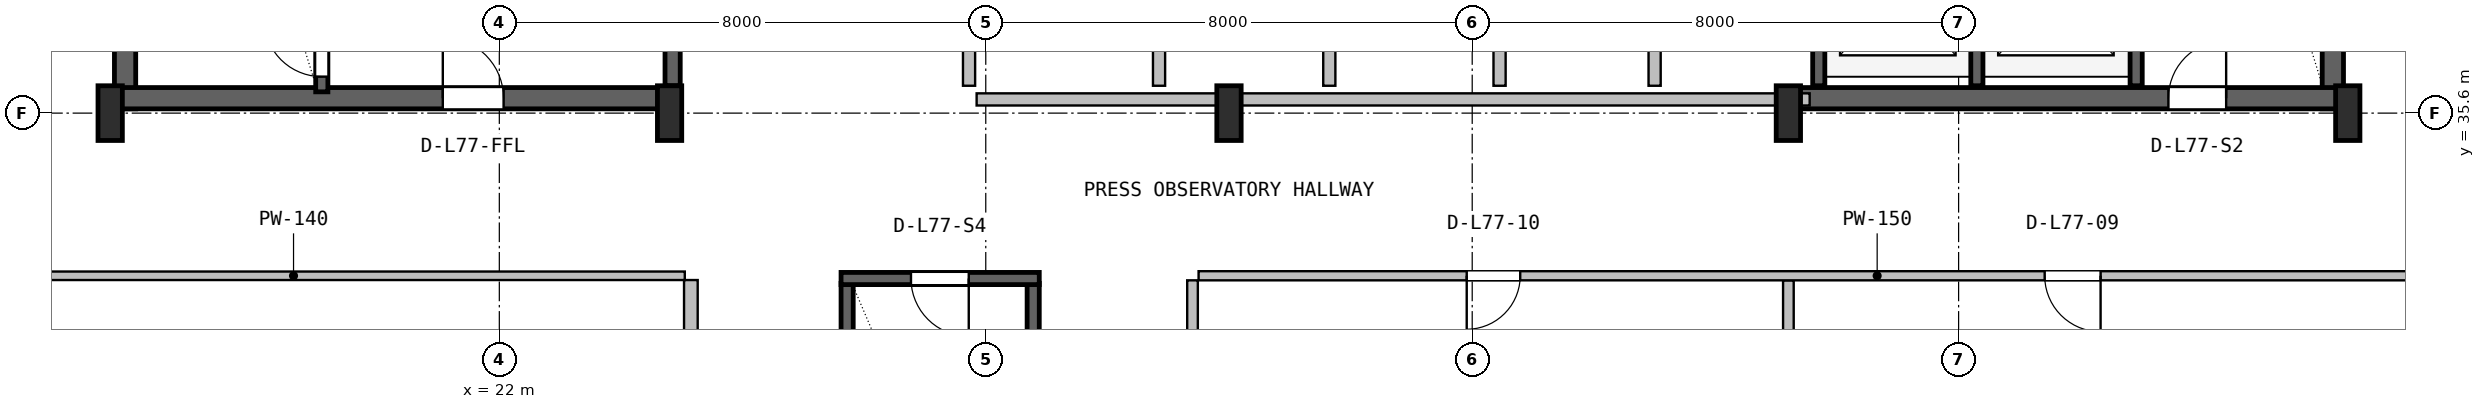
"""IFC4 building model, lengths in metres.
Left out: names, types, materials, properties, quantities, classifications, styles, units other than length and angle.
Written with IfcOpenShell. Run it as: python <this file> out.ifc"""

import sys

from ifc_helpers import new_model, si_unit, direction, frame, frame_2d, origin, origin_2d, place, context, subcontext, project, spatial, rectangle, i_section, extrude, source, transform, mapped, element, fill, save


model = new_model("IFC4")
c1 = context("Model", 3, precision=1e-05, world=origin(), true_north=direction((0.0, 1.0)))
c2 = subcontext(c1, "Body", "Model", "MODEL_VIEW")
j1 = project(units=[si_unit("LENGTHUNIT", "METRE"), si_unit("PLANEANGLEUNIT", "RADIAN")], contexts=[c1])
p1 = place(None, origin())
s1 = spatial("IfcSite", under=j1, at=p1, CompositionType="ELEMENT")
p2 = place(p1, origin())
s2 = spatial("IfcBuilding", under=s1, at=p2, CompositionType="ELEMENT")
p3 = place(p2, frame((0.0, 0.0, 309.8)))
s3 = spatial("IfcBuildingStorey", under=s2, at=p3, CompositionType="ELEMENT", Elevation=309.8)
for number, where, z_axis, x_axis in (
    (1, (15.845, 35.67, 0.0), (0.0, 0.0, 1.0), (0.0, 1.0, 0.0)),
    (2, (52.155, 35.67, 0.0), (0.0, 0.0, 1.0), (0.0, 1.0, 0.0)),
):
    element("IfcWall", number, at=place(p3, frame(where, z_axis=z_axis, x_axis=x_axis)), inside=s3, PredefinedType="SHEAR", context=c2, shape_type="SweptSolid", body=[
        extrude(rectangle(XDim=11.13, YDim=0.35, at=frame_2d((5.565, 0.0))), origin(), (0.0, 0.0, 1.0), 4.48),
    ])
p4 = place(p3, frame((15.67, 35.845, 0.0), z_axis=(0.0, 0.0, 1.0), x_axis=(1.0, 0.0, 0.0)))
e3 = element("IfcWall", 3, at=p4, inside=s3, PredefinedType="SHEAR", context=c2, shape_type="SweptSolid", body=[
    extrude(rectangle(XDim=9.13, YDim=0.35, at=frame_2d((4.565, 0.0))), origin(), (0.0, 0.0, 1.0), 4.48),
])
p5 = place(p4, frame((5.4, 0.0, 0.0)))
e4 = element("IfcOpeningElement", 4, at=p5, cuts=e3, PredefinedType="OPENING", context=c2, shape_type="SweptSolid", body=[
    extrude(rectangle(XDim=1.0, YDim=2.1, at=frame_2d((0.5, 1.05))), frame((0.0, 0.185, 0.0), z_axis=(0.0, -1.0, 0.0), x_axis=(1.0, 0.0, 0.0)), (0.0, 0.0, 1.0), 0.37),
])
p6 = place(p3, frame((43.2, 35.845, 0.0), z_axis=(0.0, 0.0, 1.0), x_axis=(1.0, 0.0, 0.0)))
e5 = element("IfcWall", 5, at=p6, inside=s3, PredefinedType="SHEAR", context=c2, shape_type="SweptSolid", body=[
    extrude(rectangle(XDim=9.13, YDim=0.35, at=frame_2d((4.565, 0.0))), origin(), (0.0, 0.0, 1.0), 4.48),
])
p7 = place(p6, frame((6.25, 0.0, 0.0)))
e6 = element("IfcOpeningElement", 6, at=p7, cuts=e5, PredefinedType="OPENING", context=c2, shape_type="SweptSolid", body=[
    extrude(rectangle(XDim=0.95, YDim=2.1, at=frame_2d((0.475, 1.05))), frame((0.0, 0.185, 0.0), z_axis=(0.0, -1.0, 0.0), x_axis=(1.0, 0.0, 0.0)), (0.0, 0.0, 1.0), 0.37),
])
m1 = source(origin(), c2, "Body", "SweptSolid", [
    extrude(i_section(OverallWidth=0.4, OverallDepth=0.9, WebThickness=0.016, FlangeThickness=0.028, FilletRadius=0.016, at=origin_2d()), origin(), (0.0, 0.0, 1.0), 4.8),
])
for number, where, z_axis, x_axis in (
    (7, (15.6, 35.6, 0.0), (0.0, 0.0, 1.0), (1.0, 0.0, 0.0)),
    (8, (24.8, 35.6, 0.0), (0.0, 0.0, 1.0), (1.0, 0.0, 0.0)),
    (9, (34.0, 35.6, 0.0), (0.0, 0.0, 1.0), (1.0, 0.0, 0.0)),
    (10, (43.2, 35.6, 0.0), (0.0, 0.0, 1.0), (1.0, 0.0, 0.0)),
    (11, (52.4, 35.6, 0.0), (0.0, 0.0, 1.0), (1.0, 0.0, 0.0)),
):
    element("IfcColumn", number, at=place(p3, frame(where, z_axis=z_axis, x_axis=x_axis)), inside=s3, PredefinedType="COLUMN", context=c2, shape_type="MappedRepresentation", body=[
        mapped(m1, transform((0.0, 0.0, 0.0), x_axis=(1.0, 0.0, 0.0), y_axis=(0.0, 1.0, 0.0), z_axis=(0.0, 0.0, 1.0), scale=1.0)),
    ])
p8 = place(p3, frame((19.08, 35.95, 0.0), z_axis=(0.0, 0.0, 1.0), x_axis=(0.0, 1.0, 0.0)))
e12 = element("IfcWall", 12, at=p8, inside=s3, PredefinedType="SHEAR", context=c2, shape_type="SweptSolid", body=[
    extrude(rectangle(XDim=9.65, YDim=0.2, at=frame_2d((4.825, 0.0))), origin(), (0.0, 0.0, 1.0), 4.48),
])
p9 = place(p8, frame((0.25, 0.0, 0.0)))
e13 = element("IfcOpeningElement", 13, at=p9, cuts=e12, PredefinedType="OPENING", context=c2, shape_type="SweptSolid", body=[
    extrude(rectangle(XDim=0.95, YDim=2.1, at=frame_2d((0.475, 1.05))), frame((0.0, 0.11, 0.0), z_axis=(0.0, -1.0, 0.0), x_axis=(1.0, 0.0, 0.0)), (0.0, 0.0, 1.0), 0.22),
])
p10 = place(p3, frame((24.85, 36.05, 0.0), z_axis=(0.0, 0.0, 1.0), x_axis=(0.0, 1.0, 0.0)))
e14 = element("IfcWall", 14, at=p10, inside=s3, PredefinedType="SHEAR", context=c2, shape_type="SweptSolid", body=[
    extrude(rectangle(XDim=10.45, YDim=0.25, at=frame_2d((5.225, 0.0))), origin(), (0.0, 0.0, 1.0), 4.48),
])
p11 = place(p3, frame((48.92, 36.05, 0.0), z_axis=(0.0, 0.0, 1.0), x_axis=(0.0, 1.0, 0.0)))
e15 = element("IfcWall", 15, at=p11, inside=s3, PredefinedType="SHEAR", context=c2, shape_type="SweptSolid", body=[
    extrude(rectangle(XDim=10.5, YDim=0.2, at=frame_2d((5.25, 0.0))), origin(), (0.0, 0.0, 1.0), 4.48),
])
for number, where, z_axis, x_axis in (
    (16, (43.7, 36.05, 0.0), (0.0, 0.0, 1.0), (0.0, 1.0, 0.0)),
    (17, (46.3, 36.05, 0.0), (0.0, 0.0, 1.0), (0.0, 1.0, 0.0)),
):
    element("IfcWall", number, at=place(p3, frame(where, z_axis=z_axis, x_axis=x_axis)), inside=s3, PredefinedType="SHEAR", context=c2, shape_type="SweptSolid", body=[
        extrude(rectangle(XDim=3.05, YDim=0.2, at=frame_2d((1.525, 0.0))), origin(), (0.0, 0.0, 1.0), 4.48),
    ])
for number, where, z_axis, x_axis in (
    (18, (27.72, 26.0, 0.0), (0.0, 0.0, 1.0), (0.0, 1.0, 0.0)),
    (19, (30.78, 26.0, 0.0), (0.0, 0.0, 1.0), (0.0, 1.0, 0.0)),
):
    element("IfcWall", number, at=place(p3, frame(where, z_axis=z_axis, x_axis=x_axis)), inside=s3, PredefinedType="SHEAR", context=c2, shape_type="SweptSolid", body=[
        extrude(rectangle(XDim=6.8, YDim=0.2, at=frame_2d((3.4, 0.0))), origin(), (0.0, 0.0, 1.0), 4.48),
    ])
p12 = place(p3, frame((27.62, 32.88, 0.0), z_axis=(0.0, 0.0, 1.0), x_axis=(1.0, 0.0, 0.0)))
e20 = element("IfcWall", 20, at=p12, inside=s3, PredefinedType="SHEAR", context=c2, shape_type="SweptSolid", body=[
    extrude(rectangle(XDim=3.26, YDim=0.2, at=frame_2d((1.63, 0.0))), origin(), (0.0, 0.0, 1.0), 4.48),
])
p13 = place(p12, frame((1.15, 0.0, 0.0)))
e21 = element("IfcOpeningElement", 21, at=p13, cuts=e20, PredefinedType="OPENING", context=c2, shape_type="SweptSolid", body=[
    extrude(rectangle(XDim=0.95, YDim=2.1, at=frame_2d((0.475, 1.05))), frame((0.0, 0.11, 0.0), z_axis=(0.0, -1.0, 0.0), x_axis=(1.0, 0.0, 0.0)), (0.0, 0.0, 1.0), 0.22),
])
p14 = place(p3, frame((29.85, 35.825, 0.0), z_axis=(0.0, 0.0, 1.0), x_axis=(1.0, 0.0, 0.0)))
e22 = element("IfcWall", 22, at=p14, inside=s3, PredefinedType="SOLIDWALL", context=c2, shape_type="SweptSolid", body=[
    extrude(rectangle(XDim=13.7, YDim=0.2, at=frame_2d((6.85, 0.0))), origin(), (0.0, 0.0, 1.0), 3.505),
])
for number, where, z_axis, x_axis in (
    (23, (32.85, 36.05, 0.0), (0.0, 0.0, 1.0), (0.0, 1.0, 0.0)),
    (24, (29.725, 36.05, 0.0), (0.0, 0.0, 1.0), (0.0, 1.0, 0.0)),
    (25, (35.65, 36.05, 0.0), (0.0, 0.0, 1.0), (0.0, 1.0, 0.0)),
    (26, (38.45, 36.05, 0.0), (0.0, 0.0, 1.0), (0.0, 1.0, 0.0)),
):
    element("IfcWall", number, at=place(p3, frame(where, z_axis=z_axis, x_axis=x_axis)), inside=s3, PredefinedType="PLUMBINGWALL", context=c2, shape_type="SweptSolid", body=[
        extrude(rectangle(XDim=3.1, YDim=0.2, at=frame_2d((1.55, 0.0))), origin(), (0.0, 0.0, 1.0), 4.46),
    ])
p15 = place(p3, frame((41.0, 36.05, 0.0), z_axis=(0.0, 0.0, 1.0), x_axis=(0.0, 1.0, 0.0)))
e27 = element("IfcWall", 27, at=p15, inside=s3, PredefinedType="SOLIDWALL", context=c2, shape_type="SweptSolid", body=[
    extrude(rectangle(XDim=3.1, YDim=0.2, at=frame_2d((1.55, 0.0))), origin(), (0.0, 0.0, 1.0), 4.46),
])
p16 = place(p3, frame((25.15, 13.38, 0.0), z_axis=(0.0, 0.0, 1.0), x_axis=(0.0, 1.0, 0.0)))
e28 = element("IfcWall", 28, at=p16, inside=s3, PredefinedType="PARTITIONING", context=c2, shape_type="SweptSolid", body=[
    extrude(rectangle(XDim=19.475, YDim=0.225, at=frame_2d((9.738, 0.0))), origin(), (0.0, 0.0, 1.0), 3.911),
])
p17 = place(p16, frame((4.465, 0.0, 0.0)))
e29 = element("IfcOpeningElement", 29, at=p17, cuts=e28, PredefinedType="OPENING", context=c2, shape_type="SweptSolid", body=[
    extrude(rectangle(XDim=1.4, YDim=2.12, at=frame_2d((0.7, 1.06))), frame((0.0, 0.123, 0.0), z_axis=(0.0, -1.0, 0.0), x_axis=(1.0, 0.0, 0.0)), (0.0, 0.0, 1.0), 0.245),
])
p18 = place(p16, frame((14.02, 0.0, 0.0)))
e30 = element("IfcOpeningElement", 30, at=p18, cuts=e28, PredefinedType="OPENING", context=c2, shape_type="SweptSolid", body=[
    extrude(rectangle(XDim=1.0, YDim=2.1, at=frame_2d((0.5, 1.05))), frame((0.0, 0.123, 0.0), z_axis=(0.0, -1.0, 0.0), x_axis=(1.0, 0.0, 0.0)), (0.0, 0.0, 1.0), 0.245),
])
p19 = place(p3, frame((12.18, 32.925, 0.0), z_axis=(0.0, 0.0, 1.0), x_axis=(1.0, 0.0, 0.0)))
e31 = element("IfcWall", 31, at=p19, inside=s3, PredefinedType="PARTITIONING", context=c2, shape_type="SweptSolid", body=[
    extrude(rectangle(XDim=12.87, YDim=0.14, at=frame_2d((6.435, 0.0))), origin(), (0.0, 0.0, 1.0), 3.911),
])
p20 = place(p3, frame((43.2, 13.38, 0.0), z_axis=(0.0, 0.0, 1.0), x_axis=(0.0, 1.0, 0.0)))
e32 = element("IfcWall", 32, at=p20, inside=s3, PredefinedType="PARTITIONING", context=c2, shape_type="SweptSolid", body=[
    extrude(rectangle(XDim=19.47, YDim=0.175, at=frame_2d((9.735, 0.0))), origin(), (0.0, 0.0, 1.0), 4.101),
])
p21 = place(p3, frame((33.4, 13.38, 0.0), z_axis=(0.0, 0.0, 1.0), x_axis=(0.0, 1.0, 0.0)))
e33 = element("IfcWall", 33, at=p21, inside=s3, PredefinedType="PARTITIONING", context=c2, shape_type="SweptSolid", body=[
    extrude(rectangle(XDim=19.47, YDim=0.175, at=frame_2d((9.735, 0.0))), origin(), (0.0, 0.0, 1.0), 3.911),
])
p22 = place(p21, frame((5.64, 0.0, 0.0)))
e34 = element("IfcOpeningElement", 34, at=p22, cuts=e33, PredefinedType="OPENING", context=c2, shape_type="SweptSolid", body=[
    extrude(rectangle(XDim=1.05, YDim=2.1, at=frame_2d((0.525, 1.05))), frame((0.0, 0.098, 0.0), z_axis=(0.0, -1.0, 0.0), x_axis=(1.0, 0.0, 0.0)), (0.0, 0.0, 1.0), 0.195),
])
p23 = place(p3, frame((33.5, 32.925, 0.0), z_axis=(0.0, 0.0, 1.0), x_axis=(1.0, 0.0, 0.0)))
e35 = element("IfcWall", 35, at=p23, inside=s3, PredefinedType="PARTITIONING", context=c2, shape_type="SweptSolid", body=[
    extrude(rectangle(XDim=22.32, YDim=0.15, at=frame_2d((11.16, 0.0))), origin(), (0.0, 0.0, 1.0), 3.911),
])
p24 = place(p23, frame((13.915, 0.0, 0.0)))
e36 = element("IfcOpeningElement", 36, at=p24, cuts=e35, PredefinedType="OPENING", context=c2, shape_type="SweptSolid", body=[
    extrude(rectangle(XDim=0.92, YDim=2.08, at=frame_2d((0.46, 1.04))), frame((0.0, 0.085, 0.0), z_axis=(0.0, -1.0, 0.0), x_axis=(1.0, 0.0, 0.0)), (0.0, 0.0, 1.0), 0.17),
])
p25 = place(p23, frame((4.41, 0.0, 0.0)))
e37 = element("IfcOpeningElement", 37, at=p25, cuts=e35, PredefinedType="OPENING", context=c2, shape_type="SweptSolid", body=[
    extrude(rectangle(XDim=0.88, YDim=2.06, at=frame_2d((0.44, 1.03))), frame((0.0, 0.085, 0.0), z_axis=(0.0, -1.0, 0.0), x_axis=(1.0, 0.0, 0.0)), (0.0, 0.0, 1.0), 0.17),
])
m2 = source(origin(), c2, "Body", "SweptSolid", [
    extrude(rectangle(XDim=0.95, YDim=2.1, at=frame_2d((0.475, 1.05))), frame((0.0, 0.025, 0.0), z_axis=(0.0, -1.0, 0.0), x_axis=(1.0, 0.0, 0.0)), (0.0, 0.0, 1.0), 0.05),
])
p26 = place(p9, origin())
e38 = element("IfcDoor", 38, at=p26, inside=s3, OperationType="SINGLE_SWING_RIGHT", PredefinedType="DOOR", context=c2, shape_type="MappedRepresentation", body=[
    mapped(m2, transform((0.0, 0.0, 0.0), x_axis=(1.0, 0.0, 0.0), y_axis=(0.0, 1.0, 0.0), z_axis=(0.0, 0.0, 1.0), scale=1.0)),
])
fill(e13, e38)
m3 = source(origin(), c2, "Body", "SweptSolid", [
    extrude(rectangle(XDim=1.0, YDim=2.1, at=frame_2d((0.5, 1.05))), frame((0.0, 0.025, 0.0), z_axis=(0.0, -1.0, 0.0), x_axis=(1.0, 0.0, 0.0)), (0.0, 0.0, 1.0), 0.05),
])
p27 = place(p5, origin())
e39 = element("IfcDoor", 39, at=p27, inside=s3, OperationType="SINGLE_SWING_LEFT", PredefinedType="DOOR", context=c2, shape_type="MappedRepresentation", body=[
    mapped(m3, transform((0.0, 0.0, 0.0), x_axis=(1.0, 0.0, 0.0), y_axis=(0.0, 1.0, 0.0), z_axis=(0.0, 0.0, 1.0), scale=1.0)),
])
fill(e4, e39)
p28 = place(p7, origin())
e40 = element("IfcDoor", 40, at=p28, inside=s3, OperationType="SINGLE_SWING_RIGHT", PredefinedType="DOOR", context=c2, shape_type="MappedRepresentation", body=[
    mapped(m2, transform((0.0, 0.0, 0.0), x_axis=(1.0, 0.0, 0.0), y_axis=(0.0, 1.0, 0.0), z_axis=(0.0, 0.0, 1.0), scale=1.0)),
])
fill(e6, e40)
p29 = place(p13, frame((0.95, 0.0, 0.0), z_axis=(0.0, 0.0, 1.0), x_axis=(-1.0, 0.0, 0.0)))
e41 = element("IfcDoor", 41, at=p29, inside=s3, OperationType="SINGLE_SWING_RIGHT", PredefinedType="DOOR", context=c2, shape_type="MappedRepresentation", body=[
    mapped(m2, transform((0.0, 0.0, 0.0), x_axis=(1.0, 0.0, 0.0), y_axis=(0.0, 1.0, 0.0), z_axis=(0.0, 0.0, 1.0), scale=1.0)),
])
fill(e21, e41)
m4 = source(origin(), c2, "Body", "SweptSolid", [
    extrude(rectangle(XDim=0.92, YDim=2.08, at=frame_2d((0.46, 1.04))), frame((0.0, 0.025, 0.0), z_axis=(0.0, -1.0, 0.0), x_axis=(1.0, 0.0, 0.0)), (0.0, 0.0, 1.0), 0.05),
])
p30 = place(p24, frame((0.92, 0.0, 0.0), z_axis=(0.0, 0.0, 1.0), x_axis=(-1.0, 0.0, 0.0)))
e42 = element("IfcDoor", 42, at=p30, inside=s3, OperationType="SINGLE_SWING_RIGHT", PredefinedType="DOOR", context=c2, shape_type="MappedRepresentation", body=[
    mapped(m4, transform((0.0, 0.0, 0.0), x_axis=(1.0, 0.0, 0.0), y_axis=(0.0, 1.0, 0.0), z_axis=(0.0, 0.0, 1.0), scale=1.0)),
])
fill(e36, e42)
m5 = source(origin(), c2, "Body", "SweptSolid", [
    extrude(rectangle(XDim=0.88, YDim=2.06, at=frame_2d((0.44, 1.03))), frame((0.0, 0.025, 0.0), z_axis=(0.0, -1.0, 0.0), x_axis=(1.0, 0.0, 0.0)), (0.0, 0.0, 1.0), 0.05),
])
p31 = place(p25, frame((0.88, 0.0, 0.0), z_axis=(0.0, 0.0, 1.0), x_axis=(-1.0, 0.0, 0.0)))
e43 = element("IfcDoor", 43, at=p31, inside=s3, OperationType="SINGLE_SWING_LEFT", PredefinedType="DOOR", context=c2, shape_type="MappedRepresentation", body=[
    mapped(m5, transform((0.0, 0.0, 0.0), x_axis=(1.0, 0.0, 0.0), y_axis=(0.0, 1.0, 0.0), z_axis=(0.0, 0.0, 1.0), scale=1.0)),
])
fill(e37, e43)
save(model, sys.argv[1])
